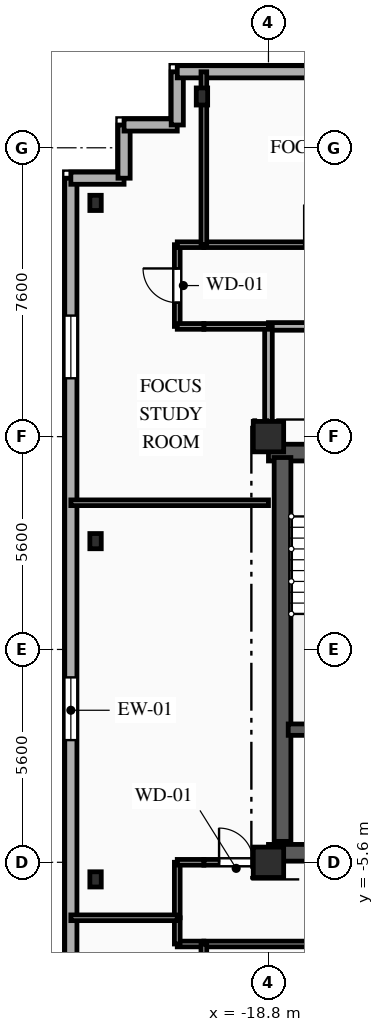
"""IFC4 building model, lengths in metres.
Left out: names, types, materials, properties, quantities, classifications, styles, units other than length and angle.
Written with IfcOpenShell. Run it as: python <this file> out.ifc"""

import sys

from ifc_helpers import new_model, si_unit, direction, frame, frame_2d, origin, origin_2d, place, context, subcontext, project, spatial, rectangle, i_section, extrude, element, fill, save


model = new_model("IFC4")
c1 = context("Model", 3, precision=1e-05, world=origin(), true_north=direction((0.0, 1.0)))
c2 = subcontext(c1, "Body", "Model", "MODEL_VIEW")
j1 = project(units=[si_unit("LENGTHUNIT", "METRE"), si_unit("PLANEANGLEUNIT", "RADIAN")], contexts=[c1])
p1 = place(None, origin())
s1 = spatial("IfcSite", under=j1, at=p1, CompositionType="ELEMENT")
p2 = place(p1, origin())
s2 = spatial("IfcBuilding", under=s1, at=p2, CompositionType="ELEMENT")
p3 = place(p2, frame((0.0, 0.0, 251.75)))
s3 = spatial("IfcBuildingStorey", under=s2, at=p3, CompositionType="ELEMENT", Elevation=251.75)
for number, where, z_axis, x_axis in (
    (1, (-18.8, -5.6, 0.0), (0.0, 0.0, 1.0), (1.0, 0.0, 0.0)),
    (2, (-18.8, 5.6, 0.0), (0.0, 0.0, 1.0), (1.0, 0.0, 0.0)),
):
    element("IfcColumn", number, at=place(p3, frame(where, z_axis=z_axis, x_axis=x_axis)), inside=s3, PredefinedType="COLUMN", context=c2, shape_type="SweptSolid", body=[
        extrude(rectangle(XDim=0.8, YDim=0.8, at=origin_2d()), origin(), (0.0, 0.0, 1.0), 3.35),
    ])
p4 = place(p3, frame((-20.55, 14.55, 0.0), z_axis=(0.0, 0.0, 1.0), x_axis=(1.0, 0.0, 0.0)))
e3 = element("IfcColumn", 3, at=p4, inside=s3, PredefinedType="COLUMN", context=c2, shape_type="SweptSolid", body=[
    extrude(i_section(OverallWidth=0.3, OverallDepth=0.45, WebThickness=0.014, FlangeThickness=0.026, FilletRadius=0.027, at=origin_2d()), origin(), (0.0, 0.0, 1.0), 3.35),
])
for number, where, z_axis, x_axis in (
    (4, (-23.35, 11.75, 0.0), (0.0, 0.0, 1.0), (1.0, 0.0, 0.0)),
    (5, (-23.35, 2.85, 0.0), (0.0, 0.0, 1.0), (1.0, 0.0, 0.0)),
    (6, (-23.35, -6.05, 0.0), (0.0, 0.0, 1.0), (1.0, 0.0, 0.0)),
):
    element("IfcColumn", number, at=place(p3, frame(where, z_axis=z_axis, x_axis=x_axis)), inside=s3, PredefinedType="COLUMN", context=c2, shape_type="SweptSolid", body=[
        extrude(i_section(OverallWidth=0.3, OverallDepth=0.4, WebThickness=0.013, FlangeThickness=0.024, FilletRadius=0.027, at=origin_2d()), origin(), (0.0, 0.0, 1.0), 3.35),
    ])
p5 = place(p3, frame((-24.0, -15.6, 0.0), z_axis=(0.0, 0.0, 1.0), x_axis=(0.0, 1.0, 0.0)))
e7 = element("IfcWall", 7, at=p5, inside=s3, PredefinedType="SOLIDWALL", context=c2, shape_type="SweptSolid", body=[
    extrude(rectangle(XDim=28.0, YDim=0.32, at=frame_2d((14.0, 0.0))), origin(), (0.0, 0.0, 1.0), 3.04),
])
p6 = place(p5, frame((3.695, 0.0, 0.85)))
e8 = element("IfcOpeningElement", 8, at=p6, cuts=e7, PredefinedType="OPENING", context=c2, shape_type="SweptSolid", body=[
    extrude(rectangle(XDim=1.65, YDim=1.85, at=frame_2d((0.825, 0.925))), frame((0.0, 0.17, 0.0), z_axis=(0.0, -1.0, 0.0), x_axis=(1.0, 0.0, 0.0)), (0.0, 0.0, 1.0), 0.34),
])
p7 = place(p5, frame((13.215, 0.0, 0.85)))
e9 = element("IfcOpeningElement", 9, at=p7, cuts=e7, PredefinedType="OPENING", context=c2, shape_type="SweptSolid", body=[
    extrude(rectangle(XDim=1.65, YDim=1.85, at=frame_2d((0.825, 0.925))), frame((0.0, 0.17, 0.0), z_axis=(0.0, -1.0, 0.0), x_axis=(1.0, 0.0, 0.0)), (0.0, 0.0, 1.0), 0.34),
])
p8 = place(p5, frame((22.735, 0.0, 0.85)))
e10 = element("IfcOpeningElement", 10, at=p8, cuts=e7, PredefinedType="OPENING", context=c2, shape_type="SweptSolid", body=[
    extrude(rectangle(XDim=1.65, YDim=1.85, at=frame_2d((0.825, 0.925))), frame((0.0, 0.17, 0.0), z_axis=(0.0, -1.0, 0.0), x_axis=(1.0, 0.0, 0.0)), (0.0, 0.0, 1.0), 0.34),
])
p9 = place(p3, frame((-24.0, 12.4, 0.0), z_axis=(0.0, 0.0, 1.0), x_axis=(1.0, 0.0, 0.0)))
e11 = element("IfcWall", 11, at=p9, inside=s3, PredefinedType="SOLIDWALL", context=c2, shape_type="SweptSolid", body=[
    extrude(rectangle(XDim=1.4, YDim=0.32, at=frame_2d((0.7, 0.0))), origin(), (0.0, 0.0, 1.0), 3.04),
])
for number, where, z_axis, x_axis in (
    (12, (-22.6, 12.4, 0.0), (0.0, 0.0, 1.0), (0.0, 1.0, 0.0)),
    (13, (-22.6, 13.8, 0.0), (0.0, 0.0, 1.0), (1.0, 0.0, 0.0)),
):
    element("IfcWall", number, at=place(p3, frame(where, z_axis=z_axis, x_axis=x_axis)), inside=s3, PredefinedType="SOLIDWALL", context=c2, shape_type="SweptSolid", body=[
        extrude(rectangle(XDim=1.4, YDim=0.32, at=frame_2d((0.7, 0.0))), origin(), (0.0, 0.0, 1.0), 3.04),
    ])
p10 = place(p3, frame((-21.2, 13.8, 0.0), z_axis=(0.0, 0.0, 1.0), x_axis=(0.0, 1.0, 0.0)))
e14 = element("IfcWall", 14, at=p10, inside=s3, PredefinedType="SOLIDWALL", context=c2, shape_type="SweptSolid", body=[
    extrude(rectangle(XDim=1.4, YDim=0.32, at=frame_2d((0.7, 0.0))), origin(), (0.0, 0.0, 1.0), 3.04),
])
p11 = place(p3, frame((-21.2, 15.2, 0.0), z_axis=(0.0, 0.0, 1.0), x_axis=(1.0, 0.0, 0.0)))
e15 = element("IfcWall", 15, at=p11, inside=s3, PredefinedType="SOLIDWALL", context=c2, shape_type="SweptSolid", body=[
    extrude(rectangle(XDim=42.0, YDim=0.32, at=frame_2d((21.0, 0.0))), origin(), (0.0, 0.0, 1.0), 3.04),
])
p12 = place(p11, frame((3.735, 0.0, 0.85)))
e16 = element("IfcOpeningElement", 16, at=p12, cuts=e15, PredefinedType="OPENING", context=c2, shape_type="SweptSolid", body=[
    extrude(rectangle(XDim=1.65, YDim=1.85, at=frame_2d((0.825, 0.925))), frame((0.0, 0.17, 0.0), z_axis=(0.0, -1.0, 0.0), x_axis=(1.0, 0.0, 0.0)), (0.0, 0.0, 1.0), 0.34),
])
p13 = place(p11, frame((12.92, 0.0, 0.85)))
e17 = element("IfcOpeningElement", 17, at=p13, cuts=e15, PredefinedType="OPENING", context=c2, shape_type="SweptSolid", body=[
    extrude(rectangle(XDim=1.6, YDim=1.85, at=frame_2d((0.8, 0.925))), frame((0.0, 0.17, 0.0), z_axis=(0.0, -1.0, 0.0), x_axis=(1.0, 0.0, 0.0)), (0.0, 0.0, 1.0), 0.34),
])
p14 = place(p11, frame((19.895, 0.0, 0.85)))
e18 = element("IfcOpeningElement", 18, at=p14, cuts=e15, PredefinedType="OPENING", context=c2, shape_type="SweptSolid", body=[
    extrude(rectangle(XDim=1.65, YDim=1.85, at=frame_2d((0.825, 0.925))), frame((0.0, 0.17, 0.0), z_axis=(0.0, -1.0, 0.0), x_axis=(1.0, 0.0, 0.0)), (0.0, 0.0, 1.0), 0.34),
])
p15 = place(p11, frame((28.095, 0.0, 0.85)))
e19 = element("IfcOpeningElement", 19, at=p15, cuts=e15, PredefinedType="OPENING", context=c2, shape_type="SweptSolid", body=[
    extrude(rectangle(XDim=1.65, YDim=1.85, at=frame_2d((0.825, 0.925))), frame((0.0, 0.17, 0.0), z_axis=(0.0, -1.0, 0.0), x_axis=(1.0, 0.0, 0.0)), (0.0, 0.0, 1.0), 0.34),
])
p16 = place(p11, frame((36.495, 0.0, 0.85)))
e20 = element("IfcOpeningElement", 20, at=p16, cuts=e15, PredefinedType="OPENING", context=c2, shape_type="SweptSolid", body=[
    extrude(rectangle(XDim=1.65, YDim=1.85, at=frame_2d((0.825, 0.925))), frame((0.0, 0.17, 0.0), z_axis=(0.0, -1.0, 0.0), x_axis=(1.0, 0.0, 0.0)), (0.0, 0.0, 1.0), 0.34),
])
p17 = place(p3, frame((-18.8, 5.18, 0.0), z_axis=(0.0, 0.0, 1.0), x_axis=(1.0, 0.0, 0.0)))
e21 = element("IfcWall", 21, at=p17, inside=s3, PredefinedType="SHEAR", context=c2, shape_type="SweptSolid", body=[
    extrude(rectangle(XDim=9.6, YDim=0.44, at=frame_2d((4.8, 0.0))), origin(), (0.0, 0.0, 1.0), 3.04),
])
p18 = place(p17, frame((1.55, 0.0, 0.0)))
e22 = element("IfcOpeningElement", 22, at=p18, cuts=e21, PredefinedType="OPENING", context=c2, shape_type="SweptSolid", body=[
    extrude(rectangle(XDim=1.1, YDim=2.15, at=frame_2d((0.55, 1.075))), frame((0.0, 0.23, 0.0), z_axis=(0.0, -1.0, 0.0), x_axis=(1.0, 0.0, 0.0)), (0.0, 0.0, 1.0), 0.46),
])
p19 = place(p17, frame((4.775, 0.0, 0.0)))
e23 = element("IfcOpeningElement", 23, at=p19, cuts=e21, PredefinedType="OPENING", context=c2, shape_type="SweptSolid", body=[
    extrude(rectangle(XDim=1.05, YDim=2.1, at=frame_2d((0.525, 1.05))), frame((0.0, 0.23, 0.0), z_axis=(0.0, -1.0, 0.0), x_axis=(1.0, 0.0, 0.0)), (0.0, 0.0, 1.0), 0.46),
])
p20 = place(p3, frame((-18.8, -5.35, 0.0), z_axis=(0.0, 0.0, 1.0), x_axis=(1.0, 0.0, 0.0)))
e24 = element("IfcWall", 24, at=p20, inside=s3, PredefinedType="SHEAR", context=c2, shape_type="SweptSolid", body=[
    extrude(rectangle(XDim=9.6, YDim=0.44, at=frame_2d((4.8, 0.0))), origin(), (0.0, 0.0, 1.0), 3.04),
])
p21 = place(p20, frame((1.05, 0.0, 0.0)))
e25 = element("IfcOpeningElement", 25, at=p21, cuts=e24, PredefinedType="OPENING", context=c2, shape_type="SweptSolid", body=[
    extrude(rectangle(XDim=0.9, YDim=2.1, at=frame_2d((0.45, 1.05))), frame((0.0, 0.23, 0.0), z_axis=(0.0, -1.0, 0.0), x_axis=(1.0, 0.0, 0.0)), (0.0, 0.0, 1.0), 0.46),
])
p22 = place(p3, frame((-18.43, -5.05, 0.0), z_axis=(0.0, 0.0, 1.0), x_axis=(0.0, 1.0, 0.0)))
e26 = element("IfcWall", 26, at=p22, inside=s3, PredefinedType="SHEAR", context=c2, shape_type="SweptSolid", body=[
    extrude(rectangle(XDim=10.1, YDim=0.44, at=frame_2d((5.05, 0.0))), origin(), (0.0, 0.0, 1.0), 3.04),
])
p23 = place(p3, frame((-18.28, -2.11, 0.0), z_axis=(0.0, 0.0, 1.0), x_axis=(1.0, 0.0, 0.0)))
e27 = element("IfcWall", 27, at=p23, inside=s3, PredefinedType="SHEAR", context=c2, shape_type="SweptSolid", body=[
    extrude(rectangle(XDim=3.18, YDim=0.3, at=frame_2d((1.59, 0.0))), origin(), (0.0, 0.0, 1.0), 3.04),
])
p24 = place(p3, frame((-12.0, 8.5, 0.0), z_axis=(0.0, 0.0, 1.0), x_axis=(-1.0, 0.0, 0.0)))
e28 = element("IfcWall", 28, at=p24, inside=s3, PredefinedType="PARTITIONING", context=c2, shape_type="SweptSolid", body=[
    extrude(rectangle(XDim=6.8, YDim=0.2, at=frame_2d((3.4, 0.0))), origin(), (0.0, 0.0, 1.0), 3.04),
])
p25 = place(p24, frame((1.715, 0.0, 0.0)))
e29 = element("IfcOpeningElement", 29, at=p25, cuts=e28, PredefinedType="OPENING", context=c2, shape_type="SweptSolid", body=[
    extrude(rectangle(XDim=1.1, YDim=2.15, at=frame_2d((0.55, 1.075))), frame((0.0, 0.11, 0.0), z_axis=(0.0, -1.0, 0.0), x_axis=(1.0, 0.0, 0.0)), (0.0, 0.0, 1.0), 0.22),
])
p26 = place(p3, frame((-18.8, 8.5, 0.0), z_axis=(0.0, 0.0, 1.0), x_axis=(0.0, -1.0, 0.0)))
e30 = element("IfcWall", 30, at=p26, inside=s3, PredefinedType="PARTITIONING", context=c2, shape_type="SweptSolid", body=[
    extrude(rectangle(XDim=2.9, YDim=0.2, at=frame_2d((1.45, 0.0))), origin(), (0.0, 0.0, 1.0), 2.665),
])
p27 = place(p3, frame((-21.2, 8.5, 0.0), z_axis=(0.0, 0.0, 1.0), x_axis=(0.0, 1.0, 0.0)))
e31 = element("IfcWall", 31, at=p27, inside=s3, PredefinedType="PARTITIONING", context=c2, shape_type="SweptSolid", body=[
    extrude(rectangle(XDim=2.15, YDim=0.15, at=frame_2d((1.075, 0.0))), origin(), (0.0, 0.0, 1.0), 2.695),
])
p28 = place(p27, frame((0.625, 0.0, 0.0)))
e32 = element("IfcOpeningElement", 32, at=p28, cuts=e31, PredefinedType="OPENING", context=c2, shape_type="SweptSolid", body=[
    extrude(rectangle(XDim=0.9, YDim=2.1, at=frame_2d((0.45, 1.05))), frame((0.0, 0.085, 0.0), z_axis=(0.0, -1.0, 0.0), x_axis=(1.0, 0.0, 0.0)), (0.0, 0.0, 1.0), 0.17),
])
p29 = place(p3, frame((-18.8, 8.5, 0.0), z_axis=(0.0, 0.0, 1.0), x_axis=(-1.0, 0.0, 0.0)))
e33 = element("IfcWall", 33, at=p29, inside=s3, PredefinedType="PARTITIONING", context=c2, shape_type="SweptSolid", body=[
    extrude(rectangle(XDim=1.7, YDim=0.15, at=frame_2d((0.85, 0.0))), origin(), (0.0, 0.0, 1.0), 3.04),
])
for number, where, z_axis, x_axis in (
    (34, (-20.5, 8.5, 0.0), (0.0, 0.0, 1.0), (-1.0, 0.0, 0.0)),
    (35, (-21.2, 10.65, 0.0), (0.0, 0.0, 1.0), (1.0, 0.0, 0.0)),
):
    element("IfcWall", number, at=place(p3, frame(where, z_axis=z_axis, x_axis=x_axis)), inside=s3, PredefinedType="PARTITIONING", context=c2, shape_type="SweptSolid", body=[
        extrude(rectangle(XDim=0.7, YDim=0.15, at=frame_2d((0.35, 0.0))), origin(), (0.0, 0.0, 1.0), 3.04),
    ])
p30 = place(p3, frame((-20.5, 10.65, 0.0), z_axis=(0.0, 0.0, 1.0), x_axis=(1.0, 0.0, 0.0)))
e36 = element("IfcWall", 36, at=p30, inside=s3, PredefinedType="PARTITIONING", context=c2, shape_type="SweptSolid", body=[
    extrude(rectangle(XDim=7.7, YDim=0.15, at=frame_2d((3.85, 0.0))), origin(), (0.0, 0.0, 1.0), 3.04),
])
p31 = place(p30, frame((2.639, 0.0, 0.0)))
e37 = element("IfcOpeningElement", 37, at=p31, cuts=e36, PredefinedType="OPENING", context=c2, shape_type="SweptSolid", body=[
    extrude(rectangle(XDim=1.05, YDim=2.15, at=frame_2d((0.525, 1.075))), frame((0.0, 0.085, 0.0), z_axis=(0.0, -1.0, 0.0), x_axis=(1.0, 0.0, 0.0)), (0.0, 0.0, 1.0), 0.17),
])
p32 = place(p3, frame((-20.5, -7.75, 0.0), z_axis=(0.0, 0.0, 1.0), x_axis=(-1.0, 0.0, 0.0)))
e38 = element("IfcWall", 38, at=p32, inside=s3, PredefinedType="PARTITIONING", context=c2, shape_type="SweptSolid", body=[
    extrude(rectangle(XDim=0.7, YDim=0.15, at=frame_2d((0.35, 0.0))), origin(), (0.0, 0.0, 1.0), 3.04),
])
p33 = place(p3, frame((-21.2, -7.75, 0.0), z_axis=(0.0, 0.0, 1.0), x_axis=(0.0, 1.0, 0.0)))
e39 = element("IfcWall", 39, at=p33, inside=s3, PredefinedType="PARTITIONING", context=c2, shape_type="SweptSolid", body=[
    extrude(rectangle(XDim=0.69, YDim=0.15, at=frame_2d((0.345, 0.0))), origin(), (0.0, 0.0, 1.0), 2.695),
])
p34 = place(p3, frame((-20.5, -5.6, 0.0), z_axis=(0.0, 0.0, 1.0), x_axis=(1.0, 0.0, 0.0)))
e40 = element("IfcWall", 40, at=p34, inside=s3, PredefinedType="PARTITIONING", context=c2, shape_type="SweptSolid", body=[
    extrude(rectangle(XDim=1.7, YDim=0.15, at=frame_2d((0.85, 0.0))), origin(), (0.0, 0.0, 1.0), 3.04),
])
p35 = place(p34, frame((0.4, 0.0, 0.0)))
e41 = element("IfcOpeningElement", 41, at=p35, cuts=e40, PredefinedType="OPENING", context=c2, shape_type="SweptSolid", body=[
    extrude(rectangle(XDim=0.9, YDim=2.1, at=frame_2d((0.45, 1.05))), frame((0.0, 0.085, 0.0), z_axis=(0.0, -1.0, 0.0), x_axis=(1.0, 0.0, 0.0)), (0.0, 0.0, 1.0), 0.17),
])
p36 = place(p3, frame((-21.2, -7.06, 0.0), z_axis=(0.0, 0.0, 1.0), x_axis=(0.0, 1.0, 0.0)))
e42 = element("IfcWall", 42, at=p36, inside=s3, PredefinedType="PARTITIONING", context=c2, shape_type="SweptSolid", body=[
    extrude(rectangle(XDim=1.46, YDim=0.15, at=frame_2d((0.73, 0.0))), origin(), (0.0, 0.0, 1.0), 2.695),
])
p37 = place(p3, frame((-21.2, -5.6, 0.0), z_axis=(0.0, 0.0, 1.0), x_axis=(1.0, 0.0, 0.0)))
e43 = element("IfcWall", 43, at=p37, inside=s3, PredefinedType="PARTITIONING", context=c2, shape_type="SweptSolid", body=[
    extrude(rectangle(XDim=0.7, YDim=0.15, at=frame_2d((0.35, 0.0))), origin(), (0.0, 0.0, 1.0), 3.04),
])
p38 = place(p3, frame((-15.125, -7.75, 0.0), z_axis=(0.0, 0.0, 1.0), x_axis=(-1.0, 0.0, 0.0)))
e44 = element("IfcWall", 44, at=p38, inside=s3, PredefinedType="PARTITIONING", context=c2, shape_type="SweptSolid", body=[
    extrude(rectangle(XDim=5.375, YDim=0.15, at=frame_2d((2.688, 0.0))), origin(), (0.0, 0.0, 1.0), 3.04),
])
p39 = place(p38, frame((0.976, 0.0, 0.0)))
e45 = element("IfcOpeningElement", 45, at=p39, cuts=e44, PredefinedType="OPENING", context=c2, shape_type="SweptSolid", body=[
    extrude(rectangle(XDim=1.05, YDim=2.15, at=frame_2d((0.525, 1.075))), frame((0.0, 0.085, 0.0), z_axis=(0.0, -1.0, 0.0), x_axis=(1.0, 0.0, 0.0)), (0.0, 0.0, 1.0), 0.17),
])
p40 = place(p3, frame((-24.0, -7.06, 0.0), z_axis=(0.0, 0.0, 1.0), x_axis=(1.0, 0.0, 0.0)))
e46 = element("IfcWall", 46, at=p40, inside=s3, PredefinedType="PARTITIONING", context=c2, shape_type="SweptSolid", body=[
    extrude(rectangle(XDim=2.8, YDim=0.15, at=frame_2d((1.4, 0.0))), origin(), (0.0, 0.0, 1.0), 3.04),
])
p41 = place(p3, frame((-20.5, -7.75, 0.0), z_axis=(0.0, 0.0, 1.0), x_axis=(0.0, -1.0, 0.0)))
e47 = element("IfcWall", 47, at=p41, inside=s3, PredefinedType="PARTITIONING", context=c2, shape_type="SweptSolid", body=[
    extrude(rectangle(XDim=10.65, YDim=0.15, at=frame_2d((5.325, 0.0))), origin(), (0.0, 0.0, 1.0), 2.665),
])
p42 = place(p41, frame((2.69, 0.0, 0.0)))
e48 = element("IfcOpeningElement", 48, at=p42, cuts=e47, PredefinedType="OPENING", context=c2, shape_type="SweptSolid", body=[
    extrude(rectangle(XDim=1.05, YDim=2.15, at=frame_2d((0.525, 1.075))), frame((0.0, 0.085, 0.0), z_axis=(0.0, -1.0, 0.0), x_axis=(1.0, 0.0, 0.0)), (0.0, 0.0, 1.0), 0.17),
])
p43 = place(p3, frame((-24.0, 3.86, 0.0), z_axis=(0.0, 0.0, 1.0), x_axis=(1.0, 0.0, 0.0)))
e49 = element("IfcWall", 49, at=p43, inside=s3, PredefinedType="PARTITIONING", context=c2, shape_type="SweptSolid", body=[
    extrude(rectangle(XDim=5.2, YDim=0.15, at=frame_2d((2.6, 0.0))), origin(), (0.0, 0.0, 1.0), 3.04),
])
p44 = place(p3, frame((-20.5, 15.2, 0.0), z_axis=(0.0, 0.0, 1.0), x_axis=(0.0, -1.0, 0.0)))
e50 = element("IfcWall", 50, at=p44, inside=s3, PredefinedType="PARTITIONING", context=c2, shape_type="SweptSolid", body=[
    extrude(rectangle(XDim=4.55, YDim=0.15, at=frame_2d((2.275, 0.0))), origin(), (0.0, 0.0, 1.0), 2.665),
])
p45 = place(p7, origin())
e51 = element("IfcWindow", 51, at=p45, inside=s3, PartitioningType="SINGLE_PANEL", PredefinedType="WINDOW", context=c2, shape_type="SweptSolid", body=[
    extrude(rectangle(XDim=1.65, YDim=1.85, at=frame_2d((0.825, 0.925))), frame((0.0, 0.03, 0.0), z_axis=(0.0, -1.0, 0.0), x_axis=(1.0, 0.0, 0.0)), (0.0, 0.0, 1.0), 0.06),
])
fill(e9, e51)
p46 = place(p8, origin())
e52 = element("IfcWindow", 52, at=p46, inside=s3, PartitioningType="SINGLE_PANEL", PredefinedType="WINDOW", context=c2, shape_type="SweptSolid", body=[
    extrude(rectangle(XDim=1.65, YDim=1.85, at=frame_2d((0.825, 0.925))), frame((0.0, 0.03, 0.0), z_axis=(0.0, -1.0, 0.0), x_axis=(1.0, 0.0, 0.0)), (0.0, 0.0, 1.0), 0.06),
])
fill(e10, e52)
p47 = place(p28, origin())
e53 = element("IfcDoor", 53, at=p47, inside=s3, OperationType="SINGLE_SWING_RIGHT", PredefinedType="DOOR", context=c2, shape_type="SweptSolid", body=[
    extrude(rectangle(XDim=0.9, YDim=2.1, at=frame_2d((0.45, 1.05))), frame((0.0, 0.025, 0.0), z_axis=(0.0, -1.0, 0.0), x_axis=(1.0, 0.0, 0.0)), (0.0, 0.0, 1.0), 0.05),
])
fill(e32, e53)
p48 = place(p35, origin())
e54 = element("IfcDoor", 54, at=p48, inside=s3, OperationType="SINGLE_SWING_LEFT", PredefinedType="DOOR", context=c2, shape_type="SweptSolid", body=[
    extrude(rectangle(XDim=0.9, YDim=2.1, at=frame_2d((0.45, 1.05))), frame((0.0, 0.025, 0.0), z_axis=(0.0, -1.0, 0.0), x_axis=(1.0, 0.0, 0.0)), (0.0, 0.0, 1.0), 0.05),
])
fill(e41, e54)
save(model, sys.argv[1])
